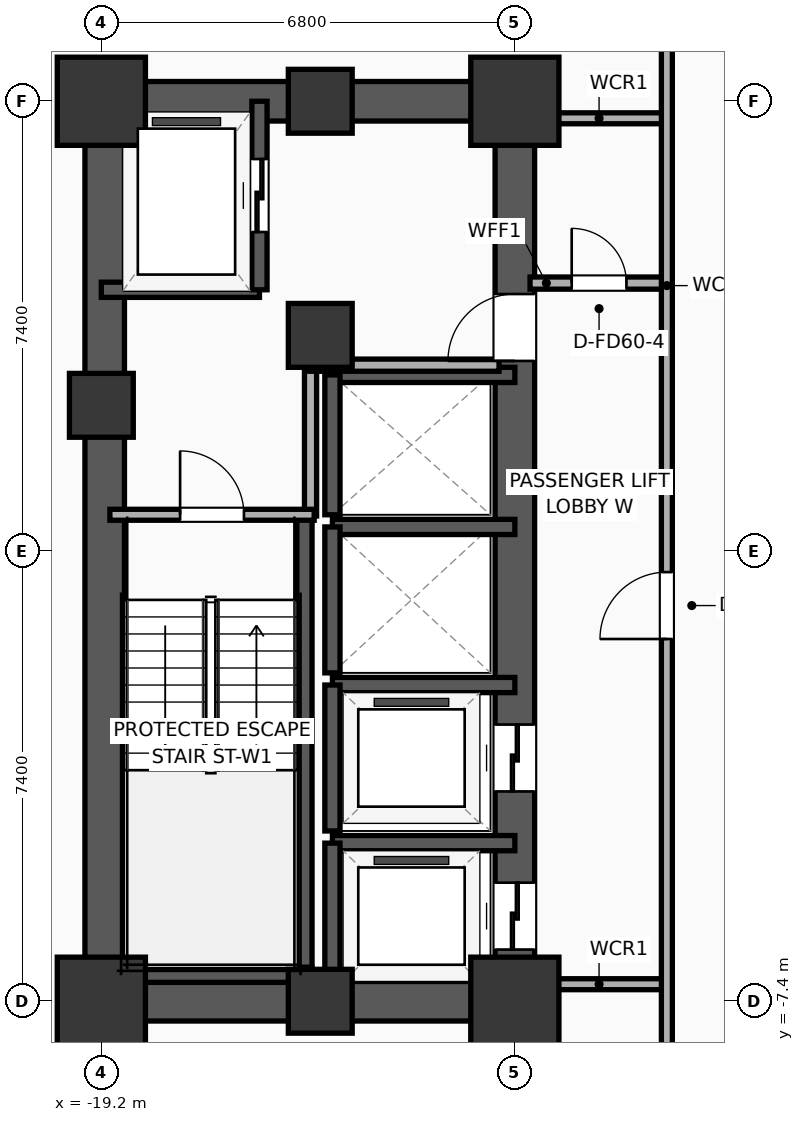
"""IFC4 building model, lengths in metres.
Left out: names, types, materials, properties, quantities, classifications, styles, units other than length and angle.
Written with IfcOpenShell. Run it as: python <this file> out.ifc"""

import sys

from ifc_helpers import new_model, si_unit, direction, frame, frame_2d, origin, origin_2d, place, context, subcontext, project, spatial, rectangle, extrude, element, fill, save


model = new_model("IFC4")
c1 = context("Model", 3, precision=1e-05, world=origin(), true_north=direction((0.0, 1.0)))
c2 = subcontext(c1, "Body", "Model", "MODEL_VIEW")
j1 = project(units=[si_unit("LENGTHUNIT", "METRE"), si_unit("PLANEANGLEUNIT", "RADIAN")], contexts=[c1])
p1 = place(None, origin())
s1 = spatial("IfcSite", under=j1, at=p1, CompositionType="ELEMENT")
p2 = place(p1, origin())
s2 = spatial("IfcBuilding", under=s1, at=p2, CompositionType="ELEMENT")
p3 = place(p2, frame((0.0, 0.0, 26.0)))
s3 = spatial("IfcBuildingStorey", under=s2, at=p3, CompositionType="ELEMENT", Elevation=26.0)
p4 = place(p3, frame((-19.2, -7.4, 0.0), z_axis=(0.0, 0.0, 1.0), x_axis=(1.0, 0.0, 0.0)))
e1 = element("IfcColumn", 1, at=p4, inside=s3, PredefinedType="COLUMN", context=c2, shape_type="SweptSolid", body=[
    extrude(rectangle(XDim=1.45, YDim=1.45, at=origin_2d()), origin(), (0.0, 0.0, 1.0), 3.9),
])
p5 = place(p3, frame((-19.2, 2.4, 0.0), z_axis=(0.0, 0.0, 1.0), x_axis=(1.0, 0.0, 0.0)))
e2 = element("IfcColumn", 2, at=p5, inside=s3, PredefinedType="COLUMN", context=c2, shape_type="SweptSolid", body=[
    extrude(rectangle(XDim=1.05, YDim=1.05, at=origin_2d()), origin(), (0.0, 0.0, 1.0), 3.9),
])
p6 = place(p3, frame((-19.2, 7.4, 0.0), z_axis=(0.0, 0.0, 1.0), x_axis=(1.0, 0.0, 0.0)))
e3 = element("IfcColumn", 3, at=p6, inside=s3, PredefinedType="COLUMN", context=c2, shape_type="SweptSolid", body=[
    extrude(rectangle(XDim=1.45, YDim=1.45, at=origin_2d()), origin(), (0.0, 0.0, 1.0), 3.9),
])
for number, where, z_axis, x_axis in (
    (4, (-15.6, -7.4, 0.0), (0.0, 0.0, 1.0), (1.0, 0.0, 0.0)),
    (5, (-15.6, 7.4, 0.0), (0.0, 0.0, 1.0), (1.0, 0.0, 0.0)),
):
    element("IfcColumn", number, at=place(p3, frame(where, z_axis=z_axis, x_axis=x_axis)), inside=s3, PredefinedType="COLUMN", context=c2, shape_type="SweptSolid", body=[
        extrude(rectangle(XDim=1.05, YDim=1.05, at=origin_2d()), origin(), (0.0, 0.0, 1.0), 3.9),
    ])
p7 = place(p3, frame((-12.4, -7.4, 0.0), z_axis=(0.0, 0.0, 1.0), x_axis=(1.0, 0.0, 0.0)))
e6 = element("IfcColumn", 6, at=p7, inside=s3, PredefinedType="COLUMN", context=c2, shape_type="SweptSolid", body=[
    extrude(rectangle(XDim=1.45, YDim=1.45, at=origin_2d()), origin(), (0.0, 0.0, 1.0), 3.9),
])
p8 = place(p3, frame((-15.6, 3.55, 0.0), z_axis=(0.0, 0.0, 1.0), x_axis=(1.0, 0.0, 0.0)))
e7 = element("IfcColumn", 7, at=p8, inside=s3, PredefinedType="COLUMN", context=c2, shape_type="SweptSolid", body=[
    extrude(rectangle(XDim=1.05, YDim=1.05, at=origin_2d()), origin(), (0.0, 0.0, 1.0), 3.9),
])
p9 = place(p3, frame((-12.4, 7.4, 0.0), z_axis=(0.0, 0.0, 1.0), x_axis=(1.0, 0.0, 0.0)))
e8 = element("IfcColumn", 8, at=p9, inside=s3, PredefinedType="COLUMN", context=c2, shape_type="SweptSolid", body=[
    extrude(rectangle(XDim=1.45, YDim=1.45, at=origin_2d()), origin(), (0.0, 0.0, 1.0), 3.9),
])
for number, where, z_axis, x_axis in (
    (9, (-19.525, -7.4, 0.0), (0.0, 0.0, 1.0), (1.0, 0.0, 0.0)),
    (10, (-19.525, 7.4, 0.0), (0.0, 0.0, 1.0), (1.0, 0.0, 0.0)),
):
    element("IfcWall", number, at=place(p3, frame(where, z_axis=z_axis, x_axis=x_axis)), inside=s3, PredefinedType="SHEAR", context=c2, shape_type="SweptSolid", body=[
        extrude(rectangle(XDim=7.45, YDim=0.65, at=frame_2d((3.725, 0.0))), origin(), (0.0, 0.0, 1.0), 3.65),
    ])
p10 = place(p3, frame((-19.145, -7.4, 0.0), z_axis=(0.0, 0.0, 1.0), x_axis=(0.0, 1.0, 0.0)))
e11 = element("IfcWall", 11, at=p10, inside=s3, PredefinedType="SHEAR", context=c2, shape_type="SweptSolid", body=[
    extrude(rectangle(XDim=14.8, YDim=0.65, at=frame_2d((7.4, 0.0))), origin(), (0.0, 0.0, 1.0), 3.65),
])
p11 = place(p3, frame((-12.4, -7.4, 0.0), z_axis=(0.0, 0.0, 1.0), x_axis=(0.0, 1.0, 0.0)))
e12 = element("IfcWall", 12, at=p11, inside=s3, PredefinedType="SHEAR", context=c2, shape_type="SweptSolid", body=[
    extrude(rectangle(XDim=14.8, YDim=0.65, at=frame_2d((7.4, 0.0))), origin(), (0.0, 0.0, 1.0), 3.65),
])
p12 = place(p11, frame((0.85, 0.0, 0.0)))
e13 = element("IfcOpeningElement", 13, at=p12, cuts=e12, PredefinedType="OPENING", context=c2, shape_type="SweptSolid", body=[
    extrude(rectangle(XDim=1.1, YDim=2.05, at=frame_2d((0.55, 1.025))), frame((0.0, 0.335, 0.0), z_axis=(0.0, -1.0, 0.0), x_axis=(1.0, 0.0, 0.0)), (0.0, 0.0, 1.0), 0.67),
])
p13 = place(p11, frame((3.45, 0.0, 0.0)))
e14 = element("IfcOpeningElement", 14, at=p13, cuts=e12, PredefinedType="OPENING", context=c2, shape_type="SweptSolid", body=[
    extrude(rectangle(XDim=1.1, YDim=2.05, at=frame_2d((0.55, 1.025))), frame((0.0, 0.335, 0.0), z_axis=(0.0, -1.0, 0.0), x_axis=(1.0, 0.0, 0.0)), (0.0, 0.0, 1.0), 0.67),
])
p14 = place(p11, frame((10.53, 0.0, 0.0)))
e15 = element("IfcOpeningElement", 15, at=p14, cuts=e12, PredefinedType="OPENING", context=c2, shape_type="SweptSolid", body=[
    extrude(rectangle(XDim=1.1, YDim=2.05, at=frame_2d((0.55, 1.025))), frame((0.0, 0.335, 0.0), z_axis=(0.0, -1.0, 0.0), x_axis=(1.0, 0.0, 0.0)), (0.0, 0.0, 1.0), 0.67),
])
p15 = place(p3, frame((-15.86, -7.085, 0.0), z_axis=(0.0, 0.0, 1.0), x_axis=(0.0, 1.0, 0.0)))
e16 = element("IfcWall", 16, at=p15, inside=s3, PredefinedType="SOLIDWALL", context=c2, shape_type="SweptSolid", body=[
    extrude(rectangle(XDim=7.685, YDim=0.25, at=frame_2d((3.843, 0.0))), origin(), (0.0, 0.0, 1.0), 3.65),
])
p16 = place(p3, frame((-19.2, -6.965, 0.0), z_axis=(0.0, 0.0, 1.0), x_axis=(1.0, 0.0, 0.0)))
e17 = element("IfcWall", 17, at=p16, inside=s3, PredefinedType="SOLIDWALL", context=c2, shape_type="SweptSolid", body=[
    extrude(rectangle(XDim=3.46, YDim=0.25, at=frame_2d((1.73, 0.0))), origin(), (0.0, 0.0, 1.0), 3.65),
])
p17 = place(p3, frame((-19.2, 4.3, 0.0), z_axis=(0.0, 0.0, 1.0), x_axis=(1.0, 0.0, 0.0)))
e18 = element("IfcWall", 18, at=p17, inside=s3, PredefinedType="SOLIDWALL", context=c2, shape_type="SweptSolid", body=[
    extrude(rectangle(XDim=2.6, YDim=0.25, at=frame_2d((1.3, 0.0))), origin(), (0.0, 0.0, 1.0), 3.65),
])
p18 = place(p3, frame((-16.6, 4.3, 0.0), z_axis=(0.0, 0.0, 1.0), x_axis=(0.0, 1.0, 0.0)))
e19 = element("IfcWall", 19, at=p18, inside=s3, PredefinedType="SOLIDWALL", context=c2, shape_type="SweptSolid", body=[
    extrude(rectangle(XDim=3.1, YDim=0.25, at=frame_2d((1.55, 0.0))), origin(), (0.0, 0.0, 1.0), 3.65),
])
p19 = place(p18, frame((0.95, 0.0, 0.0)))
e20 = element("IfcOpeningElement", 20, at=p19, cuts=e19, PredefinedType="OPENING", context=c2, shape_type="SweptSolid", body=[
    extrude(rectangle(XDim=1.2, YDim=2.05, at=frame_2d((0.6, 1.025))), frame((0.0, 0.135, 0.0), z_axis=(0.0, -1.0, 0.0), x_axis=(1.0, 0.0, 0.0)), (0.0, 0.0, 1.0), 0.27),
])
p20 = place(p3, frame((-12.4, -4.8, 0.0), z_axis=(0.0, 0.0, 1.0), x_axis=(-1.0, 0.0, 0.0)))
e21 = element("IfcWall", 21, at=p20, inside=s3, PredefinedType="SOLIDWALL", context=c2, shape_type="SweptSolid", body=[
    extrude(rectangle(XDim=3.0, YDim=0.25, at=frame_2d((1.5, 0.0))), origin(), (0.0, 0.0, 1.0), 3.65),
])
p21 = place(p3, frame((-15.4, -4.8, 0.0), z_axis=(0.0, 0.0, 1.0), x_axis=(0.0, -1.0, 0.0)))
e22 = element("IfcWall", 22, at=p21, inside=s3, PredefinedType="SOLIDWALL", context=c2, shape_type="SweptSolid", body=[
    extrude(rectangle(XDim=2.6, YDim=0.25, at=frame_2d((1.3, 0.0))), origin(), (0.0, 0.0, 1.0), 3.65),
])
p22 = place(p3, frame((-12.4, -2.2, 0.0), z_axis=(0.0, 0.0, 1.0), x_axis=(-1.0, 0.0, 0.0)))
e23 = element("IfcWall", 23, at=p22, inside=s3, PredefinedType="SOLIDWALL", context=c2, shape_type="SweptSolid", body=[
    extrude(rectangle(XDim=3.0, YDim=0.25, at=frame_2d((1.5, 0.0))), origin(), (0.0, 0.0, 1.0), 3.65),
])
p23 = place(p3, frame((-15.4, -2.2, 0.0), z_axis=(0.0, 0.0, 1.0), x_axis=(0.0, -1.0, 0.0)))
e24 = element("IfcWall", 24, at=p23, inside=s3, PredefinedType="SOLIDWALL", context=c2, shape_type="SweptSolid", body=[
    extrude(rectangle(XDim=2.4, YDim=0.25, at=frame_2d((1.2, 0.0))), origin(), (0.0, 0.0, 1.0), 3.65),
])
p24 = place(p3, frame((-12.4, 0.4, 0.0), z_axis=(0.0, 0.0, 1.0), x_axis=(-1.0, 0.0, 0.0)))
e25 = element("IfcWall", 25, at=p24, inside=s3, PredefinedType="SOLIDWALL", context=c2, shape_type="SweptSolid", body=[
    extrude(rectangle(XDim=3.0, YDim=0.25, at=frame_2d((1.5, 0.0))), origin(), (0.0, 0.0, 1.0), 3.65),
])
p25 = place(p3, frame((-15.4, 0.4, 0.0), z_axis=(0.0, 0.0, 1.0), x_axis=(0.0, -1.0, 0.0)))
e26 = element("IfcWall", 26, at=p25, inside=s3, PredefinedType="SOLIDWALL", context=c2, shape_type="SweptSolid", body=[
    extrude(rectangle(XDim=2.4, YDim=0.25, at=frame_2d((1.2, 0.0))), origin(), (0.0, 0.0, 1.0), 3.65),
])
p26 = place(p3, frame((-12.4, 2.9, 0.0), z_axis=(0.0, 0.0, 1.0), x_axis=(-1.0, 0.0, 0.0)))
e27 = element("IfcWall", 27, at=p26, inside=s3, PredefinedType="SOLIDWALL", context=c2, shape_type="SweptSolid", body=[
    extrude(rectangle(XDim=3.0, YDim=0.25, at=frame_2d((1.5, 0.0))), origin(), (0.0, 0.0, 1.0), 3.65),
])
p27 = place(p3, frame((-15.4, 2.9, 0.0), z_axis=(0.0, 0.0, 1.0), x_axis=(0.0, -1.0, 0.0)))
e28 = element("IfcWall", 28, at=p27, inside=s3, PredefinedType="SOLIDWALL", context=c2, shape_type="SweptSolid", body=[
    extrude(rectangle(XDim=2.3, YDim=0.25, at=frame_2d((1.15, 0.0))), origin(), (0.0, 0.0, 1.0), 3.65),
])
p28 = place(p3, frame((-15.76, 0.58, 0.0), z_axis=(0.0, 0.0, 1.0), x_axis=(0.0, 1.0, 0.0)))
e29 = element("IfcWall", 29, at=p28, inside=s3, PredefinedType="PARTITIONING", context=c2, shape_type="SweptSolid", body=[
    extrude(rectangle(XDim=2.52, YDim=0.2, at=frame_2d((1.26, 0.0))), origin(), (0.0, 0.0, 1.0), 3.65),
])
p29 = place(p3, frame((-15.82, 3.06, 0.0), z_axis=(0.0, 0.0, 1.0), x_axis=(1.0, 0.0, 0.0)))
e30 = element("IfcWall", 30, at=p29, inside=s3, PredefinedType="PARTITIONING", context=c2, shape_type="SweptSolid", body=[
    extrude(rectangle(XDim=3.16, YDim=0.2, at=frame_2d((1.58, 0.0))), origin(), (0.0, 0.0, 1.0), 3.65),
])
p30 = place(p3, frame((-19.06, 0.6, 0.0), z_axis=(0.0, 0.0, 1.0), x_axis=(1.0, 0.0, 0.0)))
e31 = element("IfcWall", 31, at=p30, inside=s3, PredefinedType="PARTITIONING", context=c2, shape_type="SweptSolid", body=[
    extrude(rectangle(XDim=3.36, YDim=0.18, at=frame_2d((1.68, 0.0))), origin(), (0.0, 0.0, 1.0), 3.65),
])
p31 = place(p30, frame((1.155, 0.0, 0.0)))
e32 = element("IfcOpeningElement", 32, at=p31, cuts=e31, PredefinedType="OPENING", context=c2, shape_type="SweptSolid", body=[
    extrude(rectangle(XDim=1.05, YDim=2.05, at=frame_2d((0.525, 1.025))), frame((0.0, 0.1, 0.0), z_axis=(0.0, -1.0, 0.0), x_axis=(1.0, 0.0, 0.0)), (0.0, 0.0, 1.0), 0.2),
])
p32 = place(p3, frame((-12.15, 4.41, 0.0), z_axis=(0.0, 0.0, 1.0), x_axis=(1.0, 0.0, 0.0)))
e33 = element("IfcWall", 33, at=p32, inside=s3, PredefinedType="PARTITIONING", context=c2, shape_type="SweptSolid", body=[
    extrude(rectangle(XDim=2.27, YDim=0.2, at=frame_2d((1.135, 0.0))), origin(), (0.0, 0.0, 1.0), 3.65),
])
p33 = place(p32, frame((0.685, 0.0, 0.0)))
e34 = element("IfcOpeningElement", 34, at=p33, cuts=e33, PredefinedType="OPENING", context=c2, shape_type="SweptSolid", body=[
    extrude(rectangle(XDim=0.9, YDim=2.05, at=frame_2d((0.45, 1.025))), frame((0.0, 0.11, 0.0), z_axis=(0.0, -1.0, 0.0), x_axis=(1.0, 0.0, 0.0)), (0.0, 0.0, 1.0), 0.22),
])
for number, where, z_axis, x_axis in (
    (35, (-12.15, 7.12, 0.0), (0.0, 0.0, 1.0), (1.0, 0.0, 0.0)),
    (36, (-12.15, -7.12, 0.0), (0.0, 0.0, 1.0), (1.0, 0.0, 0.0)),
):
    element("IfcWall", number, at=place(p3, frame(where, z_axis=z_axis, x_axis=x_axis)), inside=s3, PredefinedType="PARTITIONING", context=c2, shape_type="SweptSolid", body=[
        extrude(rectangle(XDim=2.27, YDim=0.18, at=frame_2d((1.135, 0.0))), origin(), (0.0, 0.0, 1.0), 2.94),
    ])
p34 = place(p3, frame((-9.9, -8.93, 0.0), z_axis=(0.0, 0.0, 1.0), x_axis=(0.0, 1.0, 0.0)))
e37 = element("IfcWall", 37, at=p34, inside=s3, PredefinedType="PARTITIONING", context=c2, shape_type="SweptSolid", body=[
    extrude(rectangle(XDim=17.86, YDim=0.18, at=frame_2d((8.93, 0.0))), origin(), (0.0, 0.0, 1.0), 3.65),
])
p35 = place(p34, frame((7.487, 0.0, 0.0)))
e38 = element("IfcOpeningElement", 38, at=p35, cuts=e37, PredefinedType="OPENING", context=c2, shape_type="SweptSolid", body=[
    extrude(rectangle(XDim=1.1, YDim=2.05, at=frame_2d((0.55, 1.025))), frame((0.0, 0.1, 0.0), z_axis=(0.0, -1.0, 0.0), x_axis=(1.0, 0.0, 0.0)), (0.0, 0.0, 1.0), 0.2),
])
p36 = place(p19, origin())
e39 = element("IfcDoor", 39, at=p36, inside=s3, OperationType="SLIDING_TO_LEFT", PredefinedType="DOOR", context=c2, shape_type="SweptSolid", body=[
    extrude(rectangle(XDim=1.2, YDim=2.05, at=frame_2d((0.6, 1.025))), frame((0.0, 0.025, 0.0), z_axis=(0.0, -1.0, 0.0), x_axis=(1.0, 0.0, 0.0)), (0.0, 0.0, 1.0), 0.05),
])
fill(e20, e39)
p37 = place(p12, origin())
e40 = element("IfcDoor", 40, at=p37, inside=s3, OperationType="SLIDING_TO_LEFT", PredefinedType="DOOR", context=c2, shape_type="SweptSolid", body=[
    extrude(rectangle(XDim=1.1, YDim=2.05, at=frame_2d((0.55, 1.025))), frame((0.0, 0.025, 0.0), z_axis=(0.0, -1.0, 0.0), x_axis=(1.0, 0.0, 0.0)), (0.0, 0.0, 1.0), 0.05),
])
fill(e13, e40)
p38 = place(p13, origin())
e41 = element("IfcDoor", 41, at=p38, inside=s3, OperationType="SLIDING_TO_LEFT", PredefinedType="DOOR", context=c2, shape_type="SweptSolid", body=[
    extrude(rectangle(XDim=1.1, YDim=2.05, at=frame_2d((0.55, 1.025))), frame((0.0, 0.025, 0.0), z_axis=(0.0, -1.0, 0.0), x_axis=(1.0, 0.0, 0.0)), (0.0, 0.0, 1.0), 0.05),
])
fill(e14, e41)
p39 = place(p31, origin())
e42 = element("IfcDoor", 42, at=p39, inside=s3, OperationType="SINGLE_SWING_LEFT", PredefinedType="DOOR", context=c2, shape_type="SweptSolid", body=[
    extrude(rectangle(XDim=1.05, YDim=2.05, at=frame_2d((0.525, 1.025))), frame((0.0, 0.025, 0.0), z_axis=(0.0, -1.0, 0.0), x_axis=(1.0, 0.0, 0.0)), (0.0, 0.0, 1.0), 0.05),
])
fill(e32, e42)
p40 = place(p33, origin())
e43 = element("IfcDoor", 43, at=p40, inside=s3, OperationType="SINGLE_SWING_LEFT", PredefinedType="DOOR", context=c2, shape_type="SweptSolid", body=[
    extrude(rectangle(XDim=0.9, YDim=2.05, at=frame_2d((0.45, 1.025))), frame((0.0, 0.025, 0.0), z_axis=(0.0, -1.0, 0.0), x_axis=(1.0, 0.0, 0.0)), (0.0, 0.0, 1.0), 0.05),
])
fill(e34, e43)
p41 = place(p35, origin())
e44 = element("IfcDoor", 44, at=p41, inside=s3, OperationType="SINGLE_SWING_LEFT", PredefinedType="DOOR", context=c2, shape_type="SweptSolid", body=[
    extrude(rectangle(XDim=1.1, YDim=2.05, at=frame_2d((0.55, 1.025))), frame((0.0, 0.025, 0.0), z_axis=(0.0, -1.0, 0.0), x_axis=(1.0, 0.0, 0.0)), (0.0, 0.0, 1.0), 0.05),
])
fill(e38, e44)
p42 = place(p14, origin())
e45 = element("IfcDoor", 45, at=p42, inside=s3, OperationType="SINGLE_SWING_LEFT", PredefinedType="DOOR", context=c2, shape_type="SweptSolid", body=[
    extrude(rectangle(XDim=1.1, YDim=2.05, at=frame_2d((0.55, 1.025))), frame((0.0, 0.025, 0.0), z_axis=(0.0, -1.0, 0.0), x_axis=(1.0, 0.0, 0.0)), (0.0, 0.0, 1.0), 0.05),
])
fill(e15, e45)
save(model, sys.argv[1])
